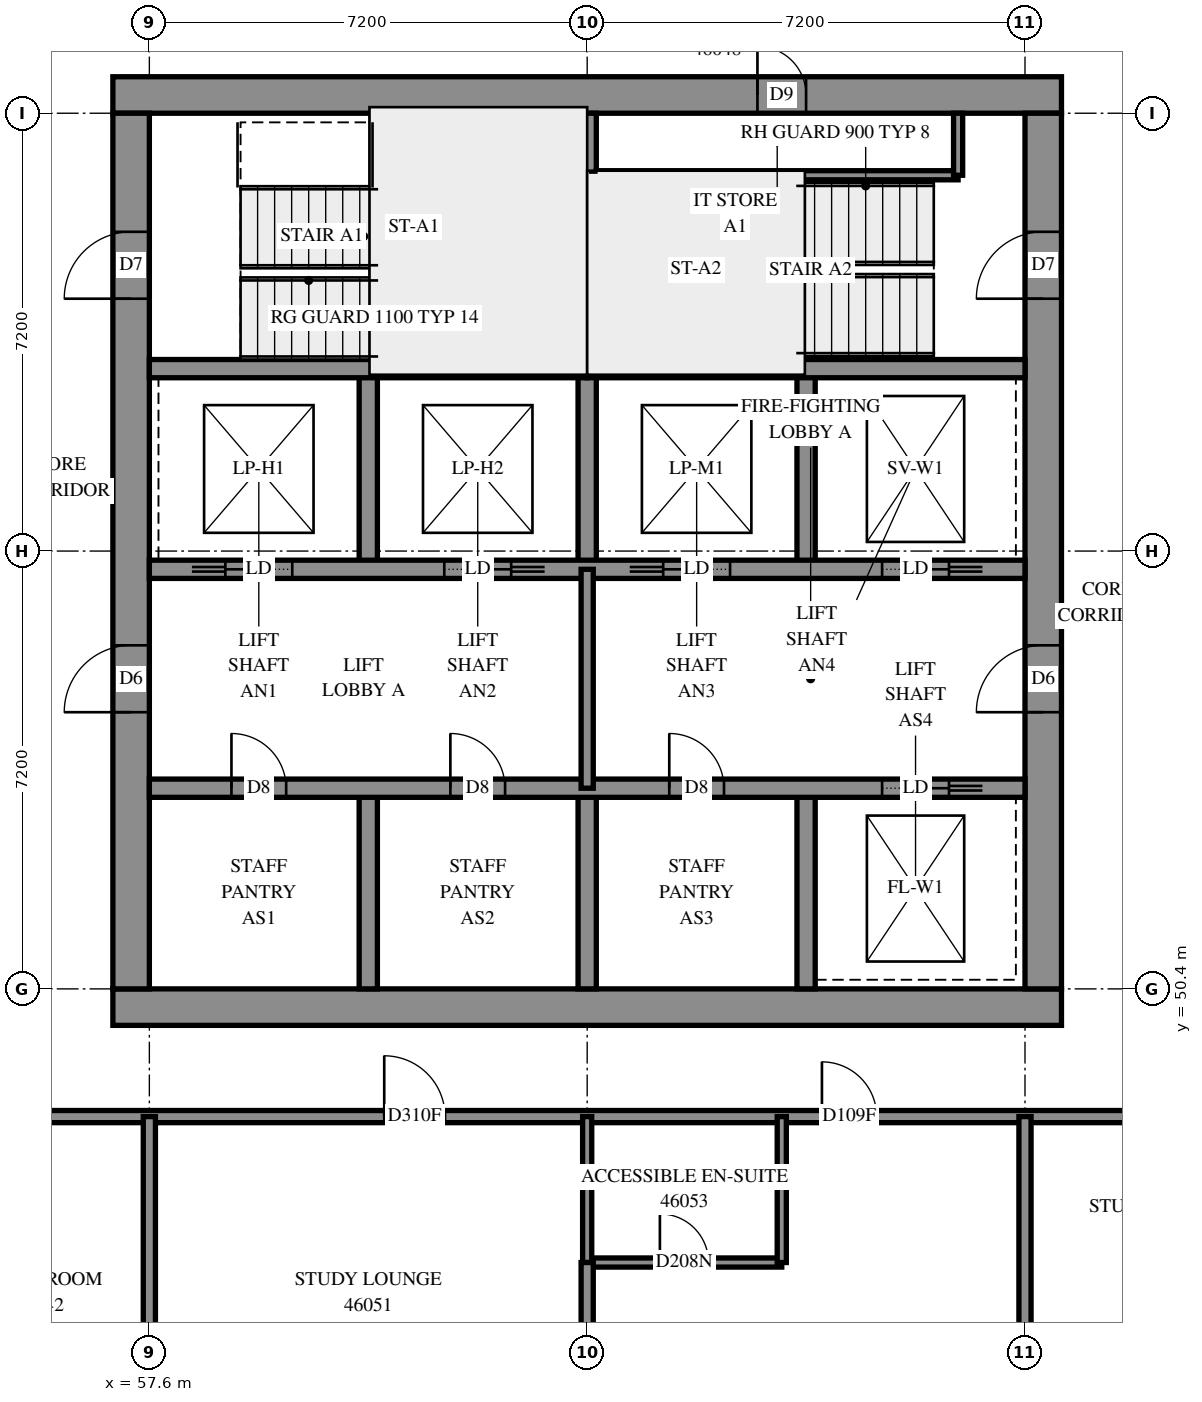
"""IFC4 building model, lengths in metres.
Left out: names, types, materials, properties, quantities, classifications, styles, units other than length and angle.
Written with IfcOpenShell. Run it as: python <this file> out.ifc"""

import sys

from ifc_helpers import new_model, si_unit, direction, frame, frame_2d, origin, place, context, subcontext, project, spatial, rectangle, extrude, element, fill, save


model = new_model("IFC4")
c1 = context("Model", 3, precision=1e-05, world=origin(), true_north=direction((0.0, 1.0)))
c2 = subcontext(c1, "Body", "Model", "MODEL_VIEW")
j1 = project(units=[si_unit("LENGTHUNIT", "METRE"), si_unit("PLANEANGLEUNIT", "RADIAN")], contexts=[c1])
p1 = place(None, origin())
s1 = spatial("IfcSite", under=j1, at=p1, CompositionType="ELEMENT")
p2 = place(p1, origin())
s2 = spatial("IfcBuilding", under=s1, at=p2, CompositionType="ELEMENT")
p3 = place(p2, frame((0.0, 0.0, 169.4)))
s3 = spatial("IfcBuildingStorey", under=s2, at=p3, CompositionType="ELEMENT", Elevation=169.4)
p4 = place(p3, frame((57.0, 50.1, -0.3), z_axis=(0.0, 0.0, 1.0), x_axis=(1.0, 0.0, 0.0)))
e1 = element("IfcWall", 1, at=p4, inside=s3, PredefinedType="SHEAR", context=c2, shape_type="SweptSolid", body=[
    extrude(rectangle(XDim=15.6, YDim=0.6, at=frame_2d((7.8, 0.0))), origin(), (0.0, 0.0, 1.0), 2.7),
])
p5 = place(p3, frame((57.0, 65.1, -0.3), z_axis=(0.0, 0.0, 1.0), x_axis=(1.0, 0.0, 0.0)))
e2 = element("IfcWall", 2, at=p5, inside=s3, PredefinedType="SHEAR", context=c2, shape_type="SweptSolid", body=[
    extrude(rectangle(XDim=15.6, YDim=0.6, at=frame_2d((7.8, 0.0))), origin(), (0.0, 0.0, 1.0), 2.7),
])
p6 = place(p5, frame((10.6, 0.0, 0.3)))
e3 = element("IfcOpeningElement", 3, at=p6, cuts=e2, PredefinedType="OPENING", context=c2, shape_type="SweptSolid", body=[
    extrude(rectangle(XDim=0.8, YDim=2.1, at=frame_2d((0.4, 1.05))), frame((0.0, 0.31, 0.0), z_axis=(0.0, -1.0, 0.0), x_axis=(1.0, 0.0, 0.0)), (0.0, 0.0, 1.0), 0.62),
])
p7 = place(p3, frame((57.3, 50.4, -0.3), z_axis=(0.0, 0.0, 1.0), x_axis=(0.0, 1.0, 0.0)))
e4 = element("IfcWall", 4, at=p7, inside=s3, PredefinedType="SHEAR", context=c2, shape_type="SweptSolid", body=[
    extrude(rectangle(XDim=14.4, YDim=0.6, at=frame_2d((7.2, 0.0))), origin(), (0.0, 0.0, 1.0), 2.7),
])
p8 = place(p7, frame((4.55, 0.0, 0.3)))
e5 = element("IfcOpeningElement", 5, at=p8, cuts=e4, PredefinedType="OPENING", context=c2, shape_type="SweptSolid", body=[
    extrude(rectangle(XDim=1.1, YDim=2.1, at=frame_2d((0.55, 1.05))), frame((0.0, 0.31, 0.0), z_axis=(0.0, -1.0, 0.0), x_axis=(1.0, 0.0, 0.0)), (0.0, 0.0, 1.0), 0.62),
])
p9 = place(p7, frame((11.35, 0.0, 0.3)))
e6 = element("IfcOpeningElement", 6, at=p9, cuts=e4, PredefinedType="OPENING", context=c2, shape_type="SweptSolid", body=[
    extrude(rectangle(XDim=1.1, YDim=2.1, at=frame_2d((0.55, 1.05))), frame((0.0, 0.31, 0.0), z_axis=(0.0, -1.0, 0.0), x_axis=(1.0, 0.0, 0.0)), (0.0, 0.0, 1.0), 0.62),
])
p10 = place(p3, frame((72.3, 50.4, -0.3), z_axis=(0.0, 0.0, 1.0), x_axis=(0.0, 1.0, 0.0)))
e7 = element("IfcWall", 7, at=p10, inside=s3, PredefinedType="SHEAR", context=c2, shape_type="SweptSolid", body=[
    extrude(rectangle(XDim=14.4, YDim=0.6, at=frame_2d((7.2, 0.0))), origin(), (0.0, 0.0, 1.0), 2.7),
])
p11 = place(p10, frame((4.55, 0.0, 0.3)))
e8 = element("IfcOpeningElement", 8, at=p11, cuts=e7, PredefinedType="OPENING", context=c2, shape_type="SweptSolid", body=[
    extrude(rectangle(XDim=1.1, YDim=2.1, at=frame_2d((0.55, 1.05))), frame((0.0, 0.31, 0.0), z_axis=(0.0, -1.0, 0.0), x_axis=(1.0, 0.0, 0.0)), (0.0, 0.0, 1.0), 0.62),
])
p12 = place(p10, frame((11.35, 0.0, 0.3)))
e9 = element("IfcOpeningElement", 9, at=p12, cuts=e7, PredefinedType="OPENING", context=c2, shape_type="SweptSolid", body=[
    extrude(rectangle(XDim=1.1, YDim=2.1, at=frame_2d((0.55, 1.05))), frame((0.0, 0.31, 0.0), z_axis=(0.0, -1.0, 0.0), x_axis=(1.0, 0.0, 0.0)), (0.0, 0.0, 1.0), 0.62),
])
for number, where, z_axis, x_axis in (
    (10, (61.2, 50.4, 0.0), (0.0, 0.0, 1.0), (0.0, 1.0, 0.0)),
    (11, (61.2, 57.3, 0.0), (0.0, 0.0, 1.0), (0.0, 1.0, 0.0)),
    (12, (64.8, 50.4, 0.0), (0.0, 0.0, 1.0), (0.0, 1.0, 0.0)),
    (13, (64.8, 57.3, 0.0), (0.0, 0.0, 1.0), (0.0, 1.0, 0.0)),
    (14, (68.4, 50.4, 0.0), (0.0, 0.0, 1.0), (0.0, 1.0, 0.0)),
    (15, (68.4, 57.3, 0.0), (0.0, 0.0, 1.0), (0.0, 1.0, 0.0)),
):
    element("IfcWall", number, at=place(p3, frame(where, z_axis=z_axis, x_axis=x_axis)), inside=s3, PredefinedType="SOLIDWALL", context=c2, shape_type="SweptSolid", body=[
        extrude(rectangle(XDim=3.3, YDim=0.3, at=frame_2d((1.65, 0.0))), origin(), (0.0, 0.0, 1.0), 3.1),
    ])
p13 = place(p3, frame((57.6, 53.7, 0.0), z_axis=(0.0, 0.0, 1.0), x_axis=(1.0, 0.0, 0.0)))
e16 = element("IfcWall", 16, at=p13, inside=s3, PredefinedType="SOLIDWALL", context=c2, shape_type="SweptSolid", body=[
    extrude(rectangle(XDim=14.4, YDim=0.3, at=frame_2d((7.2, 0.0))), origin(), (0.0, 0.0, 1.0), 3.1),
])
p14 = place(p13, frame((1.35, 0.0, 0.0)))
e17 = element("IfcOpeningElement", 17, at=p14, cuts=e16, PredefinedType="OPENING", context=c2, shape_type="SweptSolid", body=[
    extrude(rectangle(XDim=0.9, YDim=2.1, at=frame_2d((0.45, 1.05))), frame((0.0, 0.16, 0.0), z_axis=(0.0, -1.0, 0.0), x_axis=(1.0, 0.0, 0.0)), (0.0, 0.0, 1.0), 0.32),
])
p15 = place(p13, frame((4.95, 0.0, 0.0)))
e18 = element("IfcOpeningElement", 18, at=p15, cuts=e16, PredefinedType="OPENING", context=c2, shape_type="SweptSolid", body=[
    extrude(rectangle(XDim=0.9, YDim=2.1, at=frame_2d((0.45, 1.05))), frame((0.0, 0.16, 0.0), z_axis=(0.0, -1.0, 0.0), x_axis=(1.0, 0.0, 0.0)), (0.0, 0.0, 1.0), 0.32),
])
p16 = place(p13, frame((8.55, 0.0, 0.0)))
e19 = element("IfcOpeningElement", 19, at=p16, cuts=e16, PredefinedType="OPENING", context=c2, shape_type="SweptSolid", body=[
    extrude(rectangle(XDim=0.9, YDim=2.1, at=frame_2d((0.45, 1.05))), frame((0.0, 0.16, 0.0), z_axis=(0.0, -1.0, 0.0), x_axis=(1.0, 0.0, 0.0)), (0.0, 0.0, 1.0), 0.32),
])
p17 = place(p13, frame((12.05, 0.0, 0.0)))
e20 = element("IfcOpeningElement", 20, at=p17, cuts=e16, PredefinedType="OPENING", context=c2, shape_type="SweptSolid", body=[
    extrude(rectangle(XDim=1.1, YDim=2.1, at=frame_2d((0.55, 1.05))), frame((0.0, 0.16, 0.0), z_axis=(0.0, -1.0, 0.0), x_axis=(1.0, 0.0, 0.0)), (0.0, 0.0, 1.0), 0.32),
])
p18 = place(p3, frame((57.6, 57.3, 0.0), z_axis=(0.0, 0.0, 1.0), x_axis=(1.0, 0.0, 0.0)))
e21 = element("IfcWall", 21, at=p18, inside=s3, PredefinedType="SOLIDWALL", context=c2, shape_type="SweptSolid", body=[
    extrude(rectangle(XDim=14.4, YDim=0.3, at=frame_2d((7.2, 0.0))), origin(), (0.0, 0.0, 1.0), 3.1),
])
p19 = place(p18, frame((1.25, 0.0, 0.0)))
e22 = element("IfcOpeningElement", 22, at=p19, cuts=e21, PredefinedType="OPENING", context=c2, shape_type="SweptSolid", body=[
    extrude(rectangle(XDim=1.1, YDim=2.1, at=frame_2d((0.55, 1.05))), frame((0.0, 0.16, 0.0), z_axis=(0.0, -1.0, 0.0), x_axis=(1.0, 0.0, 0.0)), (0.0, 0.0, 1.0), 0.32),
])
p20 = place(p18, frame((4.85, 0.0, 0.0)))
e23 = element("IfcOpeningElement", 23, at=p20, cuts=e21, PredefinedType="OPENING", context=c2, shape_type="SweptSolid", body=[
    extrude(rectangle(XDim=1.1, YDim=2.1, at=frame_2d((0.55, 1.05))), frame((0.0, 0.16, 0.0), z_axis=(0.0, -1.0, 0.0), x_axis=(1.0, 0.0, 0.0)), (0.0, 0.0, 1.0), 0.32),
])
p21 = place(p18, frame((8.45, 0.0, 0.0)))
e24 = element("IfcOpeningElement", 24, at=p21, cuts=e21, PredefinedType="OPENING", context=c2, shape_type="SweptSolid", body=[
    extrude(rectangle(XDim=1.1, YDim=2.1, at=frame_2d((0.55, 1.05))), frame((0.0, 0.16, 0.0), z_axis=(0.0, -1.0, 0.0), x_axis=(1.0, 0.0, 0.0)), (0.0, 0.0, 1.0), 0.32),
])
p22 = place(p18, frame((12.05, 0.0, 0.0)))
e25 = element("IfcOpeningElement", 25, at=p22, cuts=e21, PredefinedType="OPENING", context=c2, shape_type="SweptSolid", body=[
    extrude(rectangle(XDim=1.1, YDim=2.1, at=frame_2d((0.55, 1.05))), frame((0.0, 0.16, 0.0), z_axis=(0.0, -1.0, 0.0), x_axis=(1.0, 0.0, 0.0)), (0.0, 0.0, 1.0), 0.32),
])
for number, where, z_axis, x_axis in (
    (26, (57.6, 60.6, 0.0), (0.0, 0.0, 1.0), (1.0, 0.0, 0.0)),
    (27, (64.8, 60.6, 0.0), (0.0, 0.0, 1.0), (1.0, 0.0, 0.0)),
):
    element("IfcWall", number, at=place(p3, frame(where, z_axis=z_axis, x_axis=x_axis)), inside=s3, PredefinedType="SOLIDWALL", context=c2, shape_type="SweptSolid", body=[
        extrude(rectangle(XDim=7.2, YDim=0.3, at=frame_2d((3.6, 0.0))), origin(), (0.0, 0.0, 1.0), 3.1),
    ])
p23 = place(p3, frame((64.8, 60.6, 0.0), z_axis=(0.0, 0.0, 1.0), x_axis=(0.0, 1.0, 0.0)))
e28 = element("IfcWall", 28, at=p23, inside=s3, PredefinedType="SOLIDWALL", context=c2, shape_type="SweptSolid", body=[
    extrude(rectangle(XDim=4.2, YDim=0.3, at=frame_2d((2.1, 0.0))), origin(), (0.0, 0.0, 1.0), 3.1),
])
p24 = place(p3, frame((64.95, 63.78, 0.0), z_axis=(0.0, 0.0, 1.0), x_axis=(1.0, 0.0, 0.0)))
e29 = element("IfcWall", 29, at=p24, inside=s3, PredefinedType="PARTITIONING", context=c2, shape_type="SweptSolid", body=[
    extrude(rectangle(XDim=5.95, YDim=0.15, at=frame_2d((2.975, 0.0))), origin(), (0.0, 0.0, 1.0), 3.1),
])
p25 = place(p3, frame((70.9, 63.78, 0.0), z_axis=(0.0, 0.0, 1.0), x_axis=(0.0, 1.0, 0.0)))
e30 = element("IfcWall", 30, at=p25, inside=s3, PredefinedType="PARTITIONING", context=c2, shape_type="SweptSolid", body=[
    extrude(rectangle(XDim=1.02, YDim=0.15, at=frame_2d((0.51, 0.0))), origin(), (0.0, 0.0, 1.0), 3.1),
])
p26 = place(p3, frame((64.8, 53.7, 0.0), z_axis=(0.0, 0.0, 1.0), x_axis=(0.0, 1.0, 0.0)))
e31 = element("IfcWall", 31, at=p26, inside=s3, PredefinedType="PARTITIONING", context=c2, shape_type="SweptSolid", body=[
    extrude(rectangle(XDim=3.6, YDim=0.2, at=frame_2d((1.8, 0.0))), origin(), (0.0, 0.0, 1.0), 3.1),
])
p27 = place(p3, frame((55.5, 48.3, 0.0), z_axis=(0.0, 0.0, 1.0), x_axis=(1.0, 0.0, 0.0)))
e32 = element("IfcWall", 32, at=p27, inside=s3, PredefinedType="PARTITIONING", context=c2, shape_type="SweptSolid", body=[
    extrude(rectangle(XDim=18.974, YDim=0.2, at=frame_2d((9.487, 0.0))), origin(), (0.0, 0.0, 1.0), 3.1),
])
p28 = place(p27, frame((5.963, 0.0, 0.0)))
e33 = element("IfcOpeningElement", 33, at=p28, cuts=e32, PredefinedType="OPENING", context=c2, shape_type="SweptSolid", body=[
    extrude(rectangle(XDim=1.0, YDim=2.1, at=frame_2d((0.5, 1.05))), frame((0.0, 0.11, 0.0), z_axis=(0.0, -1.0, 0.0), x_axis=(1.0, 0.0, 0.0)), (0.0, 0.0, 1.0), 0.22),
])
p29 = place(p27, frame((13.161, 0.0, 0.0)))
e34 = element("IfcOpeningElement", 34, at=p29, cuts=e32, PredefinedType="OPENING", context=c2, shape_type="SweptSolid", body=[
    extrude(rectangle(XDim=0.9, YDim=2.1, at=frame_2d((0.45, 1.05))), frame((0.0, 0.11, 0.0), z_axis=(0.0, -1.0, 0.0), x_axis=(1.0, 0.0, 0.0)), (0.0, 0.0, 1.0), 0.22),
])
for number, where, z_axis, x_axis in (
    (35, (57.6, 43.65, 0.0), (0.0, 0.0, 1.0), (0.0, 1.0, 0.0)),
    (36, (72.0, 43.65, 0.0), (0.0, 0.0, 1.0), (0.0, 1.0, 0.0)),
):
    element("IfcWall", number, at=place(p3, frame(where, z_axis=z_axis, x_axis=x_axis)), inside=s3, PredefinedType="PARTITIONING", context=c2, shape_type="SweptSolid", body=[
        extrude(rectangle(XDim=4.65, YDim=0.2, at=frame_2d((2.325, 0.0))), origin(), (0.0, 0.0, 1.0), 3.1),
    ])
p30 = place(p3, frame((64.8, 45.9, 0.0), z_axis=(0.0, 0.0, 1.0), x_axis=(1.0, 0.0, 0.0)))
e37 = element("IfcWall", 37, at=p30, inside=s3, PredefinedType="PARTITIONING", context=c2, shape_type="SweptSolid", body=[
    extrude(rectangle(XDim=3.2, YDim=0.15, at=frame_2d((1.6, 0.0))), origin(), (0.0, 0.0, 1.0), 3.1),
])
p31 = place(p30, frame((1.196, 0.0, 0.0)))
e38 = element("IfcOpeningElement", 38, at=p31, cuts=e37, PredefinedType="OPENING", context=c2, shape_type="SweptSolid", body=[
    extrude(rectangle(XDim=0.8, YDim=2.1, at=frame_2d((0.4, 1.05))), frame((0.0, 0.085, 0.0), z_axis=(0.0, -1.0, 0.0), x_axis=(1.0, 0.0, 0.0)), (0.0, 0.0, 1.0), 0.17),
])
for number, where, z_axis, x_axis in (
    (39, (68.0, 45.9, 0.0), (0.0, 0.0, 1.0), (0.0, 1.0, 0.0)),
    (40, (64.8, 45.9, 0.0), (0.0, 0.0, 1.0), (0.0, 1.0, 0.0)),
):
    element("IfcWall", number, at=place(p3, frame(where, z_axis=z_axis, x_axis=x_axis)), inside=s3, PredefinedType="PARTITIONING", context=c2, shape_type="SweptSolid", body=[
        extrude(rectangle(XDim=2.4, YDim=0.15, at=frame_2d((1.2, 0.0))), origin(), (0.0, 0.0, 1.0), 3.1),
    ])
p32 = place(p3, frame((64.8, 43.65, 0.0), z_axis=(0.0, 0.0, 1.0), x_axis=(0.0, 1.0, 0.0)))
e41 = element("IfcWall", 41, at=p32, inside=s3, PredefinedType="PARTITIONING", context=c2, shape_type="SweptSolid", body=[
    extrude(rectangle(XDim=2.25, YDim=0.2, at=frame_2d((1.125, 0.0))), origin(), (0.0, 0.0, 1.0), 3.1),
])
p33 = place(p6, origin())
e42 = element("IfcDoor", 42, at=p33, inside=s3, OperationType="SINGLE_SWING_RIGHT", PredefinedType="DOOR", context=c2, shape_type="SweptSolid", body=[
    extrude(rectangle(XDim=0.8, YDim=2.1, at=frame_2d((0.4, 1.05))), frame((0.0, 0.025, 0.0), z_axis=(0.0, -1.0, 0.0), x_axis=(1.0, 0.0, 0.0)), (0.0, 0.0, 1.0), 0.05),
])
fill(e3, e42)
p34 = place(p8, origin())
e43 = element("IfcDoor", 43, at=p34, inside=s3, OperationType="DOUBLE_DOOR_SINGLE_SWING", PredefinedType="DOOR", context=c2, shape_type="SweptSolid", body=[
    extrude(rectangle(XDim=1.1, YDim=2.1, at=frame_2d((0.55, 1.05))), frame((0.0, 0.025, 0.0), z_axis=(0.0, -1.0, 0.0), x_axis=(1.0, 0.0, 0.0)), (0.0, 0.0, 1.0), 0.05),
])
fill(e5, e43)
p35 = place(p11, origin())
e44 = element("IfcDoor", 44, at=p35, inside=s3, OperationType="DOUBLE_DOOR_SINGLE_SWING", PredefinedType="DOOR", context=c2, shape_type="SweptSolid", body=[
    extrude(rectangle(XDim=1.1, YDim=2.1, at=frame_2d((0.55, 1.05))), frame((0.0, 0.025, 0.0), z_axis=(0.0, -1.0, 0.0), x_axis=(1.0, 0.0, 0.0)), (0.0, 0.0, 1.0), 0.05),
])
fill(e8, e44)
p36 = place(p9, origin())
e45 = element("IfcDoor", 45, at=p36, inside=s3, OperationType="SINGLE_SWING_LEFT", PredefinedType="DOOR", context=c2, shape_type="SweptSolid", body=[
    extrude(rectangle(XDim=1.1, YDim=2.1, at=frame_2d((0.55, 1.05))), frame((0.0, 0.025, 0.0), z_axis=(0.0, -1.0, 0.0), x_axis=(1.0, 0.0, 0.0)), (0.0, 0.0, 1.0), 0.05),
])
fill(e6, e45)
p37 = place(p12, origin())
e46 = element("IfcDoor", 46, at=p37, inside=s3, OperationType="SINGLE_SWING_RIGHT", PredefinedType="DOOR", context=c2, shape_type="SweptSolid", body=[
    extrude(rectangle(XDim=1.1, YDim=2.1, at=frame_2d((0.55, 1.05))), frame((0.0, 0.025, 0.0), z_axis=(0.0, -1.0, 0.0), x_axis=(1.0, 0.0, 0.0)), (0.0, 0.0, 1.0), 0.05),
])
fill(e9, e46)
p38 = place(p14, origin())
e47 = element("IfcDoor", 47, at=p38, inside=s3, OperationType="SINGLE_SWING_LEFT", PredefinedType="DOOR", context=c2, shape_type="SweptSolid", body=[
    extrude(rectangle(XDim=0.9, YDim=2.1, at=frame_2d((0.45, 1.05))), frame((0.0, 0.025, 0.0), z_axis=(0.0, -1.0, 0.0), x_axis=(1.0, 0.0, 0.0)), (0.0, 0.0, 1.0), 0.05),
])
fill(e17, e47)
p39 = place(p15, origin())
e48 = element("IfcDoor", 48, at=p39, inside=s3, OperationType="SINGLE_SWING_LEFT", PredefinedType="DOOR", context=c2, shape_type="SweptSolid", body=[
    extrude(rectangle(XDim=0.9, YDim=2.1, at=frame_2d((0.45, 1.05))), frame((0.0, 0.025, 0.0), z_axis=(0.0, -1.0, 0.0), x_axis=(1.0, 0.0, 0.0)), (0.0, 0.0, 1.0), 0.05),
])
fill(e18, e48)
p40 = place(p16, origin())
e49 = element("IfcDoor", 49, at=p40, inside=s3, OperationType="SINGLE_SWING_LEFT", PredefinedType="DOOR", context=c2, shape_type="SweptSolid", body=[
    extrude(rectangle(XDim=0.9, YDim=2.1, at=frame_2d((0.45, 1.05))), frame((0.0, 0.025, 0.0), z_axis=(0.0, -1.0, 0.0), x_axis=(1.0, 0.0, 0.0)), (0.0, 0.0, 1.0), 0.05),
])
fill(e19, e49)
p41 = place(p17, origin())
e50 = element("IfcDoor", 50, at=p41, inside=s3, OperationType="SLIDING_TO_RIGHT", PredefinedType="DOOR", context=c2, shape_type="SweptSolid", body=[
    extrude(rectangle(XDim=1.1, YDim=2.1, at=frame_2d((0.55, 1.05))), frame((0.0, 0.025, 0.0), z_axis=(0.0, -1.0, 0.0), x_axis=(1.0, 0.0, 0.0)), (0.0, 0.0, 1.0), 0.05),
])
fill(e20, e50)
p42 = place(p19, origin())
e51 = element("IfcDoor", 51, at=p42, inside=s3, OperationType="SLIDING_TO_LEFT", PredefinedType="DOOR", context=c2, shape_type="SweptSolid", body=[
    extrude(rectangle(XDim=1.1, YDim=2.1, at=frame_2d((0.55, 1.05))), frame((0.0, 0.025, 0.0), z_axis=(0.0, -1.0, 0.0), x_axis=(1.0, 0.0, 0.0)), (0.0, 0.0, 1.0), 0.05),
])
fill(e22, e51)
p43 = place(p20, origin())
e52 = element("IfcDoor", 52, at=p43, inside=s3, OperationType="SLIDING_TO_RIGHT", PredefinedType="DOOR", context=c2, shape_type="SweptSolid", body=[
    extrude(rectangle(XDim=1.1, YDim=2.1, at=frame_2d((0.55, 1.05))), frame((0.0, 0.025, 0.0), z_axis=(0.0, -1.0, 0.0), x_axis=(1.0, 0.0, 0.0)), (0.0, 0.0, 1.0), 0.05),
])
fill(e23, e52)
p44 = place(p21, origin())
e53 = element("IfcDoor", 53, at=p44, inside=s3, OperationType="SLIDING_TO_LEFT", PredefinedType="DOOR", context=c2, shape_type="SweptSolid", body=[
    extrude(rectangle(XDim=1.1, YDim=2.1, at=frame_2d((0.55, 1.05))), frame((0.0, 0.025, 0.0), z_axis=(0.0, -1.0, 0.0), x_axis=(1.0, 0.0, 0.0)), (0.0, 0.0, 1.0), 0.05),
])
fill(e24, e53)
p45 = place(p22, origin())
e54 = element("IfcDoor", 54, at=p45, inside=s3, OperationType="SLIDING_TO_RIGHT", PredefinedType="DOOR", context=c2, shape_type="SweptSolid", body=[
    extrude(rectangle(XDim=1.1, YDim=2.1, at=frame_2d((0.55, 1.05))), frame((0.0, 0.025, 0.0), z_axis=(0.0, -1.0, 0.0), x_axis=(1.0, 0.0, 0.0)), (0.0, 0.0, 1.0), 0.05),
])
fill(e25, e54)
p46 = place(p28, origin())
e55 = element("IfcDoor", 55, at=p46, inside=s3, OperationType="SINGLE_SWING_LEFT", PredefinedType="DOOR", context=c2, shape_type="SweptSolid", body=[
    extrude(rectangle(XDim=1.0, YDim=2.1, at=frame_2d((0.5, 1.05))), frame((0.0, 0.025, 0.0), z_axis=(0.0, -1.0, 0.0), x_axis=(1.0, 0.0, 0.0)), (0.0, 0.0, 1.0), 0.05),
])
fill(e33, e55)
p47 = place(p29, origin())
e56 = element("IfcDoor", 56, at=p47, inside=s3, OperationType="SINGLE_SWING_LEFT", PredefinedType="DOOR", context=c2, shape_type="SweptSolid", body=[
    extrude(rectangle(XDim=0.9, YDim=2.1, at=frame_2d((0.45, 1.05))), frame((0.0, 0.025, 0.0), z_axis=(0.0, -1.0, 0.0), x_axis=(1.0, 0.0, 0.0)), (0.0, 0.0, 1.0), 0.05),
])
fill(e34, e56)
p48 = place(p31, origin())
e57 = element("IfcDoor", 57, at=p48, inside=s3, OperationType="SINGLE_SWING_RIGHT", PredefinedType="DOOR", context=c2, shape_type="SweptSolid", body=[
    extrude(rectangle(XDim=0.8, YDim=2.1, at=frame_2d((0.4, 1.05))), frame((0.0, 0.025, 0.0), z_axis=(0.0, -1.0, 0.0), x_axis=(1.0, 0.0, 0.0)), (0.0, 0.0, 1.0), 0.05),
])
fill(e38, e57)
save(model, sys.argv[1])
